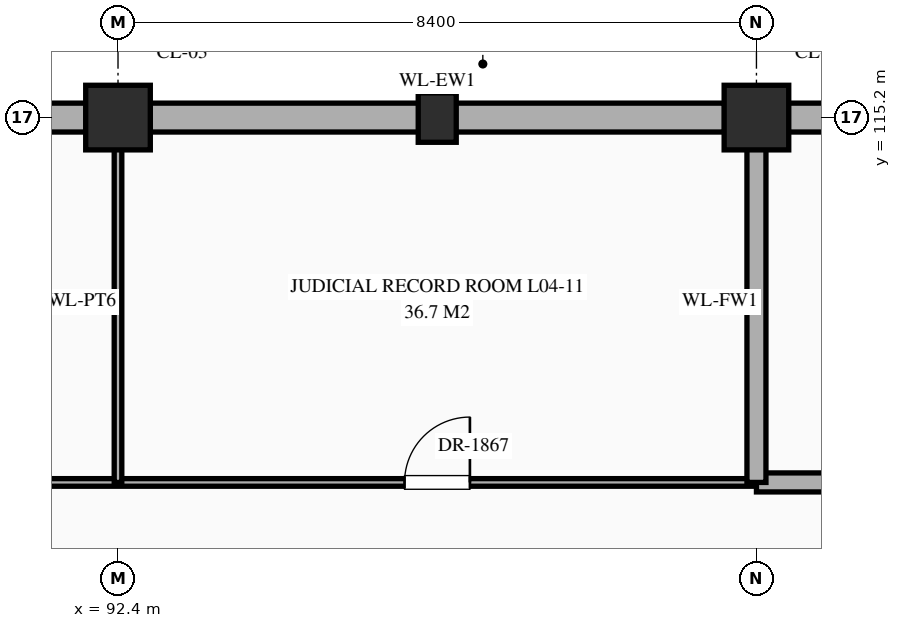
"""IFC4 building model, lengths in metres.
Left out: names, types, materials, properties, quantities, classifications, styles, units other than length and angle.
Written with IfcOpenShell. Run it as: python <this file> out.ifc"""

import sys

from ifc_helpers import new_model, si_unit, direction, frame, frame_2d, origin, origin_2d, place, context, subcontext, project, spatial, rectangle, extrude, element, fill, save


model = new_model("IFC4")
c1 = context("Model", 3, precision=1e-05, world=origin(), true_north=direction((0.0, 1.0)))
c2 = subcontext(c1, "Body", "Model", "MODEL_VIEW")
j1 = project(units=[si_unit("LENGTHUNIT", "METRE"), si_unit("PLANEANGLEUNIT", "RADIAN")], contexts=[c1])
p1 = place(None, origin())
s1 = spatial("IfcSite", under=j1, at=p1, CompositionType="ELEMENT")
p2 = place(p1, origin())
s2 = spatial("IfcBuilding", under=s1, at=p2, CompositionType="ELEMENT")
p3 = place(p2, frame((0.0, 0.0, 16.2)))
s3 = spatial("IfcBuildingStorey", under=s2, at=p3, CompositionType="ELEMENT", Elevation=16.2)
for number, where, z_axis, x_axis in (
    (1, (92.4, 115.2, 0.0), (0.0, 0.0, 1.0), (1.0, 0.0, 0.0)),
    (2, (100.8, 115.2, 0.0), (0.0, 0.0, 1.0), (1.0, 0.0, 0.0)),
):
    element("IfcColumn", number, at=place(p3, frame(where, z_axis=z_axis, x_axis=x_axis)), inside=s3, PredefinedType="COLUMN", context=c2, shape_type="SweptSolid", body=[
        extrude(rectangle(XDim=0.85, YDim=0.85, at=origin_2d()), origin(), (0.0, 0.0, 1.0), 5.4),
    ])
p4 = place(p3, frame((96.6, 115.2, 0.0), z_axis=(0.0, 0.0, 1.0), x_axis=(1.0, 0.0, 0.0)))
e3 = element("IfcColumn", 3, at=p4, inside=s3, PredefinedType="PILASTER", context=c2, shape_type="SweptSolid", body=[
    extrude(rectangle(XDim=0.5, YDim=0.65, at=origin_2d()), origin(), (0.0, 0.0, 1.0), 5.4),
])
p5 = place(p3, frame((84.42, 115.2, 0.0), z_axis=(0.0, 0.0, 1.0), x_axis=(1.0, 0.0, 0.0)))
e4 = element("IfcWall", 4, at=p5, inside=s3, PredefinedType="STANDARD", context=c2, shape_type="SweptSolid", body=[
    extrude(rectangle(XDim=7.56, YDim=0.38, at=frame_2d((3.78, 0.0))), origin(), (0.0, 0.0, 1.0), 4.47),
])
p6 = place(p3, frame((92.82, 115.2, 0.0), z_axis=(0.0, 0.0, 1.0), x_axis=(1.0, 0.0, 0.0)))
e5 = element("IfcWall", 5, at=p6, inside=s3, PredefinedType="STANDARD", context=c2, shape_type="SweptSolid", body=[
    extrude(rectangle(XDim=7.56, YDim=0.38, at=frame_2d((3.78, 0.0))), origin(), (0.0, 0.0, 1.0), 4.47),
])
p7 = place(p3, frame((101.22, 115.2, 0.0), z_axis=(0.0, 0.0, 1.0), x_axis=(1.0, 0.0, 0.0)))
e6 = element("IfcWall", 6, at=p7, inside=s3, PredefinedType="STANDARD", context=c2, shape_type="SweptSolid", body=[
    extrude(rectangle(XDim=7.56, YDim=0.38, at=frame_2d((3.78, 0.0))), origin(), (0.0, 0.0, 1.0), 4.47),
])
p8 = place(p3, frame((67.2, 110.4, 0.0), z_axis=(0.0, 0.0, 1.0), x_axis=(1.0, 0.0, 0.0)))
e7 = element("IfcWall", 7, at=p8, inside=s3, PredefinedType="STANDARD", context=c2, shape_type="SweptSolid", body=[
    extrude(rectangle(XDim=33.6, YDim=0.1, at=frame_2d((16.8, 0.0))), origin(), (0.0, 0.0, 1.0), 5.12),
])
p9 = place(p8, frame((3.67, 0.0, 0.0)))
e8 = element("IfcOpeningElement", 8, at=p9, cuts=e7, PredefinedType="OPENING", context=c2, shape_type="SweptSolid", body=[
    extrude(rectangle(XDim=1.06, YDim=2.4, at=frame_2d((0.53, 1.2))), frame((0.0, 0.062, 0.0), z_axis=(0.0, -1.0, 0.0), x_axis=(1.0, 0.0, 0.0)), (0.0, 0.0, 1.0), 0.124),
])
p10 = place(p8, frame((12.03, 0.0, 0.0)))
e9 = element("IfcOpeningElement", 9, at=p10, cuts=e7, PredefinedType="OPENING", context=c2, shape_type="SweptSolid", body=[
    extrude(rectangle(XDim=1.14, YDim=2.4, at=frame_2d((0.57, 1.2))), frame((0.0, 0.062, 0.0), z_axis=(0.0, -1.0, 0.0), x_axis=(1.0, 0.0, 0.0)), (0.0, 0.0, 1.0), 0.124),
])
p11 = place(p8, frame((20.55, 0.0, 0.0)))
e10 = element("IfcOpeningElement", 10, at=p11, cuts=e7, PredefinedType="OPENING", context=c2, shape_type="SweptSolid", body=[
    extrude(rectangle(XDim=0.9, YDim=2.15, at=frame_2d((0.45, 1.075))), frame((0.0, 0.062, 0.0), z_axis=(0.0, -1.0, 0.0), x_axis=(1.0, 0.0, 0.0)), (0.0, 0.0, 1.0), 0.124),
])
p12 = place(p8, frame((28.97, 0.0, 0.0)))
e11 = element("IfcOpeningElement", 11, at=p12, cuts=e7, PredefinedType="OPENING", context=c2, shape_type="SweptSolid", body=[
    extrude(rectangle(XDim=0.86, YDim=2.1, at=frame_2d((0.43, 1.05))), frame((0.0, 0.062, 0.0), z_axis=(0.0, -1.0, 0.0), x_axis=(1.0, 0.0, 0.0)), (0.0, 0.0, 1.0), 0.124),
])
p13 = place(p3, frame((100.8, 110.4, 0.0), z_axis=(0.0, 0.0, 1.0), x_axis=(1.0, 0.0, 0.0)))
e12 = element("IfcWall", 12, at=p13, inside=s3, PredefinedType="STANDARD", context=c2, shape_type="SweptSolid", body=[
    extrude(rectangle(XDim=8.4, YDim=0.25, at=frame_2d((4.2, 0.0))), origin(), (0.0, 0.0, 1.0), 5.12),
])
p14 = place(p13, frame((3.65, 0.0, 0.0)))
e13 = element("IfcOpeningElement", 13, at=p14, cuts=e12, PredefinedType="OPENING", context=c2, shape_type="SweptSolid", body=[
    extrude(rectangle(XDim=1.1, YDim=2.2, at=frame_2d((0.55, 1.1))), frame((0.0, 0.137, 0.0), z_axis=(0.0, -1.0, 0.0), x_axis=(1.0, 0.0, 0.0)), (0.0, 0.0, 1.0), 0.274),
])
p15 = place(p3, frame((92.4, 110.4, 0.0), z_axis=(0.0, 0.0, 1.0), x_axis=(0.0, 1.0, 0.0)))
e14 = element("IfcWall", 14, at=p15, inside=s3, PredefinedType="STANDARD", context=c2, shape_type="SweptSolid", body=[
    extrude(rectangle(XDim=4.76, YDim=0.1, at=frame_2d((2.38, 0.0))), origin(), (0.0, 0.0, 1.0), 4.37),
])
p16 = place(p3, frame((100.8, 110.4, 0.0), z_axis=(0.0, 0.0, 1.0), x_axis=(0.0, 1.0, 0.0)))
e15 = element("IfcWall", 15, at=p16, inside=s3, PredefinedType="STANDARD", context=c2, shape_type="SweptSolid", body=[
    extrude(rectangle(XDim=4.76, YDim=0.25, at=frame_2d((2.38, 0.0))), origin(), (0.0, 0.0, 1.0), 4.37),
])
p17 = place(p12, origin())
e16 = element("IfcDoor", 16, at=p17, inside=s3, OperationType="SINGLE_SWING_RIGHT", PredefinedType="DOOR", context=c2, shape_type="SweptSolid", body=[
    extrude(rectangle(XDim=0.86, YDim=2.1, at=frame_2d((0.43, 1.05))), frame((0.0, 0.025, 0.0), z_axis=(0.0, -1.0, 0.0), x_axis=(1.0, 0.0, 0.0)), (0.0, 0.0, 1.0), 0.05),
])
fill(e11, e16)
save(model, sys.argv[1])
